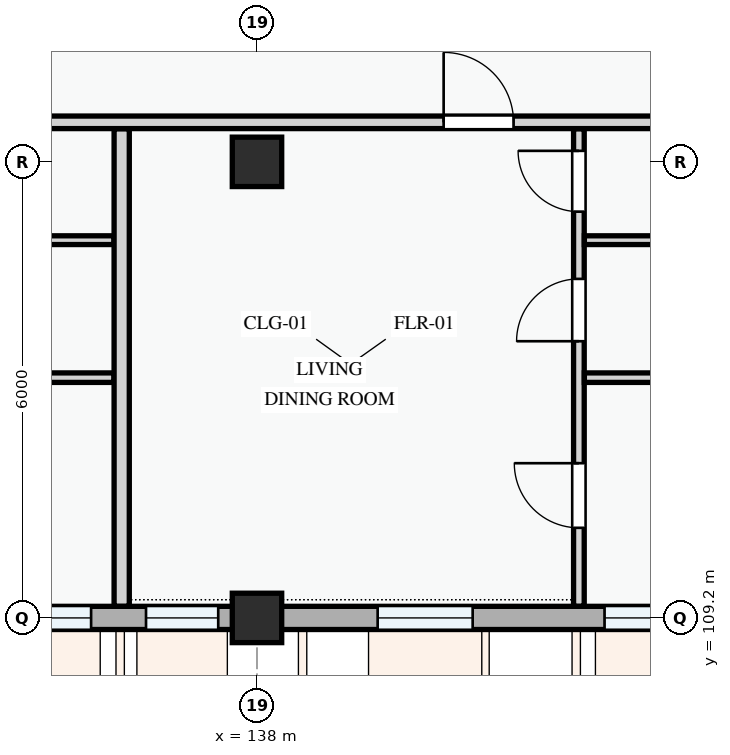
"""IFC4 building model, lengths in metres.
Left out: names, types, materials, properties, quantities, classifications, styles, units other than length and angle.
Written with IfcOpenShell. Run it as: python <this file> out.ifc"""

import sys

from ifc_helpers import new_model, si_unit, direction, frame, frame_2d, origin, origin_2d, place, context, subcontext, project, spatial, rectangle, extrude, element, fill, save


model = new_model("IFC4")
c1 = context("Model", 3, precision=1e-05, world=origin(), true_north=direction((0.0, 1.0)))
c2 = subcontext(c1, "Body", "Model", "MODEL_VIEW")
j1 = project(units=[si_unit("LENGTHUNIT", "METRE"), si_unit("PLANEANGLEUNIT", "RADIAN")], contexts=[c1])
p1 = place(None, origin())
s1 = spatial("IfcSite", under=j1, at=p1, CompositionType="ELEMENT")
p2 = place(p1, origin())
s2 = spatial("IfcBuilding", under=s1, at=p2, CompositionType="ELEMENT")
p3 = place(p2, frame((0.0, 0.0, 21.3)))
s3 = spatial("IfcBuildingStorey", under=s2, at=p3, CompositionType="ELEMENT", Elevation=21.3)
for number, where, z_axis, x_axis in (
    (1, (138.0, 109.2, 0.0), (0.0, 0.0, 1.0), (1.0, 0.0, 0.0)),
    (2, (138.0, 115.2, 0.0), (0.0, 0.0, 1.0), (1.0, 0.0, 0.0)),
):
    element("IfcColumn", number, at=place(p3, frame(where, z_axis=z_axis, x_axis=x_axis)), inside=s3, PredefinedType="COLUMN", context=c2, shape_type="SweptSolid", body=[
        extrude(rectangle(XDim=0.65, YDim=0.65, at=origin_2d()), origin(), (0.0, 0.0, 1.0), 3.3),
    ])
p4 = place(p3, frame((129.6, 109.2, 0.0), z_axis=(0.0, 0.0, 1.0), x_axis=(1.0, 0.0, 0.0)))
e3 = element("IfcWall", 3, at=p4, inside=s3, PredefinedType="STANDARD", context=c2, shape_type="SweptSolid", body=[
    extrude(rectangle(XDim=8.4, YDim=0.305, at=frame_2d((4.2, 0.0))), origin(), (0.0, 0.0, 1.0), 2.375),
])
p5 = place(p4, frame((0.923, 0.0, 0.78)))
e4 = element("IfcOpeningElement", 4, at=p5, cuts=e3, PredefinedType="OPENING", context=c2, shape_type="SweptSolid", body=[
    extrude(rectangle(XDim=1.82, YDim=1.46, at=frame_2d((0.91, 0.73))), frame((0.0, 0.163, 0.0), z_axis=(0.0, -1.0, 0.0), x_axis=(1.0, 0.0, 0.0)), (0.0, 0.0, 1.0), 0.325),
])
p6 = place(p4, frame((3.738, 0.0, 0.78)))
e5 = element("IfcOpeningElement", 5, at=p6, cuts=e3, PredefinedType="OPENING", context=c2, shape_type="SweptSolid", body=[
    extrude(rectangle(XDim=2.48, YDim=1.46, at=frame_2d((1.24, 0.73))), frame((0.0, 0.163, 0.0), z_axis=(0.0, -1.0, 0.0), x_axis=(1.0, 0.0, 0.0)), (0.0, 0.0, 1.0), 0.325),
])
p7 = place(p4, frame((6.94, 0.0, 0.78)))
e6 = element("IfcOpeningElement", 6, at=p7, cuts=e3, PredefinedType="OPENING", context=c2, shape_type="SweptSolid", body=[
    extrude(rectangle(XDim=0.95, YDim=1.15, at=frame_2d((0.475, 0.575))), frame((0.0, 0.163, 0.0), z_axis=(0.0, -1.0, 0.0), x_axis=(1.0, 0.0, 0.0)), (0.0, 0.0, 1.0), 0.325),
])
p8 = place(p3, frame((138.0, 109.2, 0.0), z_axis=(0.0, 0.0, 1.0), x_axis=(1.0, 0.0, 0.0)))
e7 = element("IfcWall", 7, at=p8, inside=s3, PredefinedType="STANDARD", context=c2, shape_type="SweptSolid", body=[
    extrude(rectangle(XDim=6.0, YDim=0.305, at=frame_2d((3.0, 0.0))), origin(), (0.0, 0.0, 1.0), 2.475),
])
p9 = place(p8, frame((1.587, 0.0, 0.78)))
e8 = element("IfcOpeningElement", 8, at=p9, cuts=e7, PredefinedType="OPENING", context=c2, shape_type="SweptSolid", body=[
    extrude(rectangle(XDim=1.25, YDim=1.3, at=frame_2d((0.625, 0.65))), frame((0.0, 0.163, 0.0), z_axis=(0.0, -1.0, 0.0), x_axis=(1.0, 0.0, 0.0)), (0.0, 0.0, 1.0), 0.325),
])
p10 = place(p8, frame((4.573, 0.0, 0.78)))
e9 = element("IfcOpeningElement", 9, at=p10, cuts=e7, PredefinedType="OPENING", context=c2, shape_type="SweptSolid", body=[
    extrude(rectangle(XDim=0.9, YDim=1.2, at=frame_2d((0.45, 0.6))), frame((0.0, 0.163, 0.0), z_axis=(0.0, -1.0, 0.0), x_axis=(1.0, 0.0, 0.0)), (0.0, 0.0, 1.0), 0.325),
])
p11 = place(p3, frame((127.897, 112.361, 0.0), z_axis=(0.0, 0.0, 1.0), x_axis=(1.0, 0.0, 0.0)))
e10 = element("IfcWall", 10, at=p11, inside=s3, PredefinedType="PARTITIONING", context=c2, shape_type="SweptSolid", body=[
    extrude(rectangle(XDim=8.221, YDim=0.125, at=frame_2d((4.11, 0.0))), origin(), (0.0, 0.0, 1.0), 3.0),
])
p12 = place(p3, frame((127.897, 114.17, 0.0), z_axis=(0.0, 0.0, 1.0), x_axis=(1.0, 0.0, 0.0)))
e11 = element("IfcWall", 11, at=p12, inside=s3, PredefinedType="PARTITIONING", context=c2, shape_type="SweptSolid", body=[
    extrude(rectangle(XDim=8.221, YDim=0.115, at=frame_2d((4.11, 0.0))), origin(), (0.0, 0.0, 1.0), 3.0),
])
p13 = place(p3, frame((142.235, 109.354, 0.0), z_axis=(0.0, 0.0, 1.0), x_axis=(0.0, 1.0, 0.0)))
e12 = element("IfcWall", 12, at=p13, inside=s3, PredefinedType="PARTITIONING", context=c2, shape_type="SweptSolid", body=[
    extrude(rectangle(XDim=6.281, YDim=0.14, at=frame_2d((3.141, 0.0))), origin(), (0.0, 0.0, 1.0), 3.0),
])
p14 = place(p13, frame((1.031, 0.0, 0.0)))
e13 = element("IfcOpeningElement", 13, at=p14, cuts=e12, PredefinedType="OPENING", context=c2, shape_type="SweptSolid", body=[
    extrude(rectangle(XDim=0.85, YDim=2.1, at=frame_2d((0.425, 1.05))), frame((0.0, 0.08, 0.0), z_axis=(0.0, -1.0, 0.0), x_axis=(1.0, 0.0, 0.0)), (0.0, 0.0, 1.0), 0.16),
])
p15 = place(p13, frame((3.486, 0.0, 0.0)))
e14 = element("IfcOpeningElement", 14, at=p15, cuts=e12, PredefinedType="OPENING", context=c2, shape_type="SweptSolid", body=[
    extrude(rectangle(XDim=0.82, YDim=2.08, at=frame_2d((0.41, 1.04))), frame((0.0, 0.08, 0.0), z_axis=(0.0, -1.0, 0.0), x_axis=(1.0, 0.0, 0.0)), (0.0, 0.0, 1.0), 0.16),
])
p16 = place(p13, frame((5.19, 0.0, 0.0)))
e15 = element("IfcOpeningElement", 15, at=p16, cuts=e12, PredefinedType="OPENING", context=c2, shape_type="SweptSolid", body=[
    extrude(rectangle(XDim=0.8, YDim=2.1, at=frame_2d((0.4, 1.05))), frame((0.0, 0.08, 0.0), z_axis=(0.0, -1.0, 0.0), x_axis=(1.0, 0.0, 0.0)), (0.0, 0.0, 1.0), 0.16),
])
p17 = place(p3, frame((142.307, 112.361, 0.0), z_axis=(0.0, 0.0, 1.0), x_axis=(1.0, 0.0, 0.0)))
e16 = element("IfcWall", 16, at=p17, inside=s3, PredefinedType="PARTITIONING", context=c2, shape_type="SweptSolid", body=[
    extrude(rectangle(XDim=7.659, YDim=0.125, at=frame_2d((3.829, 0.0))), origin(), (0.0, 0.0, 1.0), 3.0),
])
p18 = place(p3, frame((142.307, 114.17, 0.0), z_axis=(0.0, 0.0, 1.0), x_axis=(1.0, 0.0, 0.0)))
e17 = element("IfcWall", 17, at=p18, inside=s3, PredefinedType="PARTITIONING", context=c2, shape_type="SweptSolid", body=[
    extrude(rectangle(XDim=7.659, YDim=0.115, at=frame_2d((3.829, 0.0))), origin(), (0.0, 0.0, 1.0), 3.0),
])
p19 = place(p3, frame((136.22, 109.354, 0.0), z_axis=(0.0, 0.0, 1.0), x_axis=(0.0, 1.0, 0.0)))
e18 = element("IfcWall", 18, at=p19, inside=s3, PredefinedType="PARTITIONING", context=c2, shape_type="SweptSolid", body=[
    extrude(rectangle(XDim=6.281, YDim=0.2, at=frame_2d((3.141, 0.0))), origin(), (0.0, 0.0, 1.0), 3.0),
])
p20 = place(p3, frame((80.554, 115.72, 0.0), z_axis=(0.0, 0.0, 1.0), x_axis=(1.0, 0.0, 0.0)))
e19 = element("IfcWall", 19, at=p20, inside=s3, PredefinedType="PARTITIONING", context=c2, shape_type="SweptSolid", body=[
    extrude(rectangle(XDim=69.496, YDim=0.165, at=frame_2d((34.748, 0.0))), origin(), (0.0, 0.0, 1.0), 3.0),
])
p21 = place(p20, frame((2.359, 0.0, 0.0)))
e20 = element("IfcOpeningElement", 20, at=p21, cuts=e19, PredefinedType="OPENING", context=c2, shape_type="SweptSolid", body=[
    extrude(rectangle(XDim=0.96, YDim=2.12, at=frame_2d((0.48, 1.06))), frame((0.0, 0.093, 0.0), z_axis=(0.0, -1.0, 0.0), x_axis=(1.0, 0.0, 0.0)), (0.0, 0.0, 1.0), 0.185),
])
p22 = place(p20, frame((23.96, 0.0, 0.0)))
e21 = element("IfcOpeningElement", 21, at=p22, cuts=e19, PredefinedType="OPENING", context=c2, shape_type="SweptSolid", body=[
    extrude(rectangle(XDim=0.92, YDim=2.1, at=frame_2d((0.46, 1.05))), frame((0.0, 0.093, 0.0), z_axis=(0.0, -1.0, 0.0), x_axis=(1.0, 0.0, 0.0)), (0.0, 0.0, 1.0), 0.185),
])
p23 = place(p20, frame((39.125, 0.0, 0.0)))
e22 = element("IfcOpeningElement", 22, at=p23, cuts=e19, PredefinedType="OPENING", context=c2, shape_type="SweptSolid", body=[
    extrude(rectangle(XDim=0.92, YDim=2.1, at=frame_2d((0.46, 1.05))), frame((0.0, 0.093, 0.0), z_axis=(0.0, -1.0, 0.0), x_axis=(1.0, 0.0, 0.0)), (0.0, 0.0, 1.0), 0.185),
])
p24 = place(p20, frame((59.901, 0.0, 0.0)))
e23 = element("IfcOpeningElement", 23, at=p24, cuts=e19, PredefinedType="OPENING", context=c2, shape_type="SweptSolid", body=[
    extrude(rectangle(XDim=0.92, YDim=2.1, at=frame_2d((0.46, 1.05))), frame((0.0, 0.093, 0.0), z_axis=(0.0, -1.0, 0.0), x_axis=(1.0, 0.0, 0.0)), (0.0, 0.0, 1.0), 0.185),
])
p25 = place(p6, origin())
e24 = element("IfcWindow", 24, at=p25, inside=s3, PartitioningType="DOUBLE_PANEL_VERTICAL", PredefinedType="WINDOW", context=c2, shape_type="SweptSolid", body=[
    extrude(rectangle(XDim=2.48, YDim=1.46, at=frame_2d((1.24, 0.73))), frame((0.0, 0.03, 0.0), z_axis=(0.0, -1.0, 0.0), x_axis=(1.0, 0.0, 0.0)), (0.0, 0.0, 1.0), 0.06),
])
fill(e5, e24)
p26 = place(p7, origin())
e25 = element("IfcWindow", 25, at=p26, inside=s3, PartitioningType="SINGLE_PANEL", PredefinedType="WINDOW", context=c2, shape_type="SweptSolid", body=[
    extrude(rectangle(XDim=0.95, YDim=1.15, at=frame_2d((0.475, 0.575))), frame((0.0, 0.03, 0.0), z_axis=(0.0, -1.0, 0.0), x_axis=(1.0, 0.0, 0.0)), (0.0, 0.0, 1.0), 0.06),
])
fill(e6, e25)
p27 = place(p9, origin())
e26 = element("IfcWindow", 26, at=p27, inside=s3, PartitioningType="SINGLE_PANEL", PredefinedType="WINDOW", context=c2, shape_type="SweptSolid", body=[
    extrude(rectangle(XDim=1.25, YDim=1.3, at=frame_2d((0.625, 0.65))), frame((0.0, 0.03, 0.0), z_axis=(0.0, -1.0, 0.0), x_axis=(1.0, 0.0, 0.0)), (0.0, 0.0, 1.0), 0.06),
])
fill(e8, e26)
p28 = place(p10, origin())
e27 = element("IfcWindow", 27, at=p28, inside=s3, PartitioningType="SINGLE_PANEL", PredefinedType="WINDOW", context=c2, shape_type="SweptSolid", body=[
    extrude(rectangle(XDim=0.9, YDim=1.2, at=frame_2d((0.45, 0.6))), frame((0.0, 0.03, 0.0), z_axis=(0.0, -1.0, 0.0), x_axis=(1.0, 0.0, 0.0)), (0.0, 0.0, 1.0), 0.06),
])
fill(e9, e27)
p29 = place(p14, origin())
e28 = element("IfcDoor", 28, at=p29, inside=s3, OperationType="SINGLE_SWING_RIGHT", PredefinedType="DOOR", context=c2, shape_type="SweptSolid", body=[
    extrude(rectangle(XDim=0.85, YDim=2.1, at=frame_2d((0.425, 1.05))), frame((0.0, 0.025, 0.0), z_axis=(0.0, -1.0, 0.0), x_axis=(1.0, 0.0, 0.0)), (0.0, 0.0, 1.0), 0.05),
])
fill(e13, e28)
p30 = place(p15, origin())
e29 = element("IfcDoor", 29, at=p30, inside=s3, OperationType="SINGLE_SWING_LEFT", PredefinedType="DOOR", context=c2, shape_type="SweptSolid", body=[
    extrude(rectangle(XDim=0.82, YDim=2.08, at=frame_2d((0.41, 1.04))), frame((0.0, 0.025, 0.0), z_axis=(0.0, -1.0, 0.0), x_axis=(1.0, 0.0, 0.0)), (0.0, 0.0, 1.0), 0.05),
])
fill(e14, e29)
p31 = place(p16, origin())
e30 = element("IfcDoor", 30, at=p31, inside=s3, OperationType="SINGLE_SWING_RIGHT", PredefinedType="DOOR", context=c2, shape_type="SweptSolid", body=[
    extrude(rectangle(XDim=0.8, YDim=2.1, at=frame_2d((0.4, 1.05))), frame((0.0, 0.025, 0.0), z_axis=(0.0, -1.0, 0.0), x_axis=(1.0, 0.0, 0.0)), (0.0, 0.0, 1.0), 0.05),
])
fill(e15, e30)
p32 = place(p24, origin())
e31 = element("IfcDoor", 31, at=p32, inside=s3, OperationType="SINGLE_SWING_LEFT", PredefinedType="DOOR", context=c2, shape_type="SweptSolid", body=[
    extrude(rectangle(XDim=0.92, YDim=2.1, at=frame_2d((0.46, 1.05))), frame((0.0, 0.025, 0.0), z_axis=(0.0, -1.0, 0.0), x_axis=(1.0, 0.0, 0.0)), (0.0, 0.0, 1.0), 0.05),
])
fill(e23, e31)
save(model, sys.argv[1])
